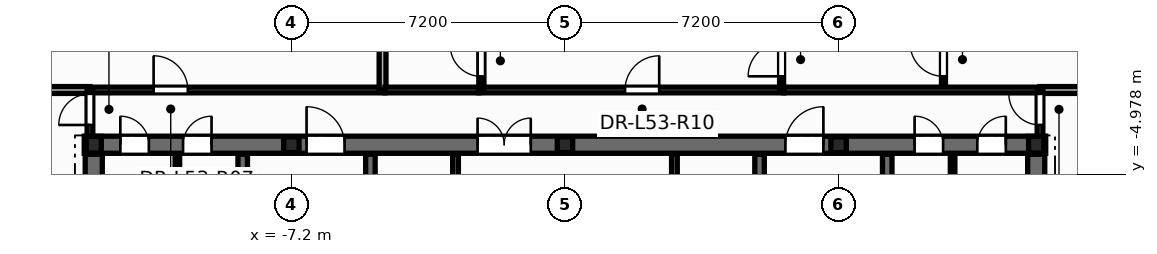
"""IFC4 building model, lengths in metres.
Left out: names, types, materials, properties, quantities, classifications, styles, units other than length and angle.
Written with IfcOpenShell. Run it as: python <this file> out.ifc"""

import sys

from ifc_helpers import new_model, si_unit, direction, frame, frame_2d, origin, origin_2d, place, context, subcontext, project, spatial, rectangle, i_section, extrude, element, fill, save


model = new_model("IFC4")
c1 = context("Model", 3, precision=1e-05, world=origin(), true_north=direction((0.0, 1.0)))
c2 = subcontext(c1, "Body", "Model", "MODEL_VIEW")
j1 = project(units=[si_unit("LENGTHUNIT", "METRE"), si_unit("PLANEANGLEUNIT", "RADIAN")], contexts=[c1])
p1 = place(None, origin())
s1 = spatial("IfcSite", under=j1, at=p1, CompositionType="ELEMENT")
p2 = place(p1, origin())
s2 = spatial("IfcBuilding", under=s1, at=p2, CompositionType="ELEMENT")
p3 = place(p2, frame((0.0, 0.0, 203.7)))
s3 = spatial("IfcBuildingStorey", under=s2, at=p3, CompositionType="ELEMENT", Elevation=203.7)
for number, where, z_axis, x_axis in (
    (1, (12.4, -4.2, 0.0), (0.0, 0.0, 1.0), (1.0, 0.0, 0.0)),
    (2, (-12.4, -4.2, 0.0), (0.0, 0.0, 1.0), (1.0, 0.0, 0.0)),
):
    element("IfcColumn", number, at=place(p3, frame(where, z_axis=z_axis, x_axis=x_axis)), inside=s3, PredefinedType="COLUMN", context=c2, shape_type="SweptSolid", body=[
        extrude(i_section(OverallWidth=0.4, OverallDepth=0.44, WebThickness=0.028, FlangeThickness=0.04, at=origin_2d()), origin(), (0.0, 0.0, 1.0), 3.6),
    ])
for number, where, z_axis, x_axis in (
    (3, (-7.2, -4.2, 0.0), (0.0, 0.0, 1.0), (1.0, 0.0, 0.0)),
    (4, (0.0, -4.2, 0.0), (0.0, 0.0, 1.0), (1.0, 0.0, 0.0)),
    (5, (7.2, -4.2, 0.0), (0.0, 0.0, 1.0), (1.0, 0.0, 0.0)),
):
    element("IfcColumn", number, at=place(p3, frame(where, z_axis=z_axis, x_axis=x_axis)), inside=s3, PredefinedType="PILASTER", context=c2, shape_type="SweptSolid", body=[
        extrude(i_section(OverallWidth=0.405, OverallDepth=0.414, WebThickness=0.022, FlangeThickness=0.032, at=origin_2d()), origin(), (0.0, 0.0, 1.0), 3.6),
    ])
p4 = place(p3, frame((-2.88, -7.1, 0.0), z_axis=(0.0, 0.0, 1.0), x_axis=(0.0, 1.0, 0.0)))
e6 = element("IfcWall", 6, at=p4, inside=s3, PredefinedType="PARTITIONING", context=c2, shape_type="SweptSolid", body=[
    extrude(rectangle(XDim=2.65, YDim=0.15, at=frame_2d((1.325, 0.0))), origin(), (0.0, 0.0, 1.0), 3.345),
])
p5 = place(p4, frame((0.85, 0.0, 0.0)))
e7 = element("IfcOpeningElement", 7, at=p5, cuts=e6, PredefinedType="OPENING", context=c2, shape_type="SweptSolid", body=[
    extrude(rectangle(XDim=0.886, YDim=2.104, at=frame_2d((0.44, 1.052))), frame((0.0, 0.085, 0.0), z_axis=(0.0, -1.0, 0.0), x_axis=(1.0, 0.0, 0.0)), (0.0, 0.0, 1.0), 0.17),
])
p6 = place(p3, frame((2.88, -7.1, 0.0), z_axis=(0.0, 0.0, 1.0), x_axis=(0.0, 1.0, 0.0)))
e8 = element("IfcWall", 8, at=p6, inside=s3, PredefinedType="PARTITIONING", context=c2, shape_type="SweptSolid", body=[
    extrude(rectangle(XDim=2.65, YDim=0.15, at=frame_2d((1.325, 0.0))), origin(), (0.0, 0.0, 1.0), 3.345),
])
p7 = place(p6, frame((0.85, 0.0, 0.0)))
e9 = element("IfcOpeningElement", 9, at=p7, cuts=e8, PredefinedType="OPENING", context=c2, shape_type="SweptSolid", body=[
    extrude(rectangle(XDim=0.886, YDim=2.104, at=frame_2d((0.44, 1.052))), frame((0.0, 0.085, 0.0), z_axis=(0.0, -1.0, 0.0), x_axis=(1.0, 0.0, 0.0)), (0.0, 0.0, 1.0), 0.17),
])
for number, where, z_axis, x_axis in (
    (10, (-10.2, -5.52, 0.0), (0.0, 0.0, 1.0), (0.0, 1.0, 0.0)),
    (11, (10.2, -5.52, 0.0), (0.0, 0.0, 1.0), (0.0, 1.0, 0.0)),
):
    element("IfcWall", number, at=place(p3, frame(where, z_axis=z_axis, x_axis=x_axis)), inside=s3, PredefinedType="PARTITIONING", context=c2, shape_type="SweptSolid", body=[
        extrude(rectangle(XDim=1.12, YDim=0.12, at=frame_2d((0.56, 0.0))), origin(), (0.0, 0.0, 1.0), 3.345),
    ])
p8 = place(p3, frame((-12.65, -4.2, 0.0), z_axis=(0.0, 0.0, 1.0), x_axis=(1.0, 0.0, 0.0)))
e12 = element("IfcWall", 12, at=p8, inside=s3, PredefinedType="SHEAR", context=c2, shape_type="SweptSolid", body=[
    extrude(rectangle(XDim=25.3, YDim=0.45, at=frame_2d((12.65, 0.0))), origin(), (0.0, 0.0, 1.0), 3.6),
])
p9 = place(p8, frame((0.95, 0.0, 0.0)))
e13 = element("IfcOpeningElement", 13, at=p9, cuts=e12, PredefinedType="OPENING", context=c2, shape_type="SweptSolid", body=[
    extrude(rectangle(XDim=0.756, YDim=2.054, at=frame_2d((0.375, 1.027))), frame((0.0, 0.235, 0.0), z_axis=(0.0, -1.0, 0.0), x_axis=(1.0, 0.0, 0.0)), (0.0, 0.0, 1.0), 0.47),
])
p10 = place(p8, frame((2.6, 0.0, 0.0)))
e14 = element("IfcOpeningElement", 14, at=p10, cuts=e12, PredefinedType="OPENING", context=c2, shape_type="SweptSolid", body=[
    extrude(rectangle(XDim=0.756, YDim=2.054, at=frame_2d((0.375, 1.027))), frame((0.0, 0.235, 0.0), z_axis=(0.0, -1.0, 0.0), x_axis=(1.0, 0.0, 0.0)), (0.0, 0.0, 1.0), 0.47),
])
p11 = place(p8, frame((21.85, 0.0, 0.0)))
e15 = element("IfcOpeningElement", 15, at=p11, cuts=e12, PredefinedType="OPENING", context=c2, shape_type="SweptSolid", body=[
    extrude(rectangle(XDim=0.756, YDim=2.054, at=frame_2d((0.375, 1.027))), frame((0.0, 0.235, 0.0), z_axis=(0.0, -1.0, 0.0), x_axis=(1.0, 0.0, 0.0)), (0.0, 0.0, 1.0), 0.47),
])
p12 = place(p8, frame((23.5, 0.0, 0.0)))
e16 = element("IfcOpeningElement", 16, at=p12, cuts=e12, PredefinedType="OPENING", context=c2, shape_type="SweptSolid", body=[
    extrude(rectangle(XDim=0.756, YDim=2.054, at=frame_2d((0.375, 1.027))), frame((0.0, 0.235, 0.0), z_axis=(0.0, -1.0, 0.0), x_axis=(1.0, 0.0, 0.0)), (0.0, 0.0, 1.0), 0.47),
])
p13 = place(p8, frame((5.85, 0.0, 0.0)))
e17 = element("IfcOpeningElement", 17, at=p13, cuts=e12, PredefinedType="OPENING", context=c2, shape_type="SweptSolid", body=[
    extrude(rectangle(XDim=1.006, YDim=2.104, at=frame_2d((0.5, 1.052))), frame((0.0, 0.235, 0.0), z_axis=(0.0, -1.0, 0.0), x_axis=(1.0, 0.0, 0.0)), (0.0, 0.0, 1.0), 0.47),
])
p14 = place(p8, frame((10.35, 0.0, 0.0)))
e18 = element("IfcOpeningElement", 18, at=p14, cuts=e12, PredefinedType="OPENING", context=c2, shape_type="SweptSolid", body=[
    extrude(rectangle(XDim=1.406, YDim=2.154, at=frame_2d((0.7, 1.077))), frame((0.0, 0.235, 0.0), z_axis=(0.0, -1.0, 0.0), x_axis=(1.0, 0.0, 0.0)), (0.0, 0.0, 1.0), 0.47),
])
p15 = place(p8, frame((18.45, 0.0, 0.0)))
e19 = element("IfcOpeningElement", 19, at=p15, cuts=e12, PredefinedType="OPENING", context=c2, shape_type="SweptSolid", body=[
    extrude(rectangle(XDim=1.006, YDim=2.104, at=frame_2d((0.5, 1.052))), frame((0.0, 0.235, 0.0), z_axis=(0.0, -1.0, 0.0), x_axis=(1.0, 0.0, 0.0)), (0.0, 0.0, 1.0), 0.47),
])
p16 = place(p3, frame((-8.48, -13.85, 0.0), z_axis=(0.0, 0.0, 1.0), x_axis=(0.0, 1.0, 0.0)))
e20 = element("IfcWall", 20, at=p16, inside=s3, PredefinedType="SHEAR", context=c2, shape_type="SweptSolid", body=[
    extrude(rectangle(XDim=9.4, YDim=0.25, at=frame_2d((4.7, 0.0))), origin(), (0.0, 0.0, 1.0), 3.6),
])
p17 = place(p16, frame((6.95, 0.0, 0.0)))
e21 = element("IfcOpeningElement", 21, at=p17, cuts=e20, PredefinedType="OPENING", context=c2, shape_type="SweptSolid", body=[
    extrude(rectangle(XDim=1.006, YDim=2.104, at=frame_2d((0.5, 1.052))), frame((0.0, 0.135, 0.0), z_axis=(0.0, -1.0, 0.0), x_axis=(1.0, 0.0, 0.0)), (0.0, 0.0, 1.0), 0.27),
])
p18 = place(p3, frame((8.48, -13.85, 0.0), z_axis=(0.0, 0.0, 1.0), x_axis=(0.0, 1.0, 0.0)))
e22 = element("IfcWall", 22, at=p18, inside=s3, PredefinedType="SHEAR", context=c2, shape_type="SweptSolid", body=[
    extrude(rectangle(XDim=9.4, YDim=0.25, at=frame_2d((4.7, 0.0))), origin(), (0.0, 0.0, 1.0), 3.6),
])
p19 = place(p18, frame((6.95, 0.0, 0.0)))
e23 = element("IfcOpeningElement", 23, at=p19, cuts=e22, PredefinedType="OPENING", context=c2, shape_type="SweptSolid", body=[
    extrude(rectangle(XDim=1.006, YDim=2.104, at=frame_2d((0.5, 1.052))), frame((0.0, 0.135, 0.0), z_axis=(0.0, -1.0, 0.0), x_axis=(1.0, 0.0, 0.0)), (0.0, 0.0, 1.0), 0.27),
])
for number, where, z_axis, x_axis in (
    (24, (-5.12, -13.85, 0.0), (0.0, 0.0, 1.0), (0.0, 1.0, 0.0)),
    (25, (5.12, -13.85, 0.0), (0.0, 0.0, 1.0), (0.0, 1.0, 0.0)),
):
    element("IfcWall", number, at=place(p3, frame(where, z_axis=z_axis, x_axis=x_axis)), inside=s3, PredefinedType="SHEAR", context=c2, shape_type="SweptSolid", body=[
        extrude(rectangle(XDim=9.4, YDim=0.25, at=frame_2d((4.7, 0.0))), origin(), (0.0, 0.0, 1.0), 3.6),
    ])
for number, where, z_axis, x_axis in (
    (26, (-12.4, -13.85, 0.0), (0.0, 0.0, 1.0), (0.0, 1.0, 0.0)),
    (27, (12.4, -13.85, 0.0), (0.0, 0.0, 1.0), (0.0, 1.0, 0.0)),
):
    element("IfcWall", number, at=place(p3, frame(where, z_axis=z_axis, x_axis=x_axis)), inside=s3, PredefinedType="SHEAR", context=c2, shape_type="SweptSolid", body=[
        extrude(rectangle(XDim=9.4, YDim=0.45, at=frame_2d((4.7, 0.0))), origin(), (0.0, 0.0, 1.0), 3.6),
    ])
p20 = place(p3, frame((-2.26, -2.76, 0.0), z_axis=(0.0, 0.0, 1.0), x_axis=(1.0, 0.0, 0.0)))
e28 = element("IfcWall", 28, at=p20, inside=s3, PredefinedType="PARTITIONING", context=c2, shape_type="SweptSolid", body=[
    extrude(rectangle(XDim=8.02, YDim=0.15, at=frame_2d((4.01, 0.0))), origin(), (0.0, 0.0, 1.0), 2.32),
])
p21 = place(p20, frame((3.84, 0.0, 0.0)))
e29 = element("IfcOpeningElement", 29, at=p21, cuts=e28, PredefinedType="OPENING", context=c2, shape_type="SweptSolid", body=[
    extrude(rectangle(XDim=0.906, YDim=2.104, at=frame_2d((0.45, 1.052))), frame((0.0, 0.085, 0.0), z_axis=(0.0, -1.0, 0.0), x_axis=(1.0, 0.0, 0.0)), (0.0, 0.0, 1.0), 0.17),
])
p22 = place(p3, frame((-12.5, -2.76, 0.0), z_axis=(0.0, 0.0, 1.0), x_axis=(1.0, 0.0, 0.0)))
e30 = element("IfcWall", 30, at=p22, inside=s3, PredefinedType="PARTITIONING", context=c2, shape_type="SweptSolid", body=[
    extrude(rectangle(XDim=7.76, YDim=0.15, at=frame_2d((3.88, 0.0))), origin(), (0.0, 0.0, 1.0), 2.32),
])
p23 = place(p22, frame((1.675, 0.0, 0.0)))
e31 = element("IfcOpeningElement", 31, at=p23, cuts=e30, PredefinedType="OPENING", context=c2, shape_type="SweptSolid", body=[
    extrude(rectangle(XDim=0.906, YDim=2.104, at=frame_2d((0.45, 1.052))), frame((0.0, 0.085, 0.0), z_axis=(0.0, -1.0, 0.0), x_axis=(1.0, 0.0, 0.0)), (0.0, 0.0, 1.0), 0.17),
])
p24 = place(p3, frame((9.96, -2.76, 0.0), z_axis=(0.0, 0.0, 1.0), x_axis=(0.0, 1.0, 0.0)))
e32 = element("IfcWall", 32, at=p24, inside=s3, PredefinedType="PARTITIONING", context=c2, shape_type="SweptSolid", body=[
    extrude(rectangle(XDim=6.911, YDim=0.105, at=frame_2d((3.455, 0.0))), origin(), (0.0, 0.0, 1.0), 2.62),
])
p25 = place(p24, frame((0.36, 0.0, 0.0)))
e33 = element("IfcOpeningElement", 33, at=p25, cuts=e32, PredefinedType="OPENING", context=c2, shape_type="SweptSolid", body=[
    extrude(rectangle(XDim=0.886, YDim=2.104, at=frame_2d((0.44, 1.052))), frame((0.0, 0.062, 0.0), z_axis=(0.0, -1.0, 0.0), x_axis=(1.0, 0.0, 0.0)), (0.0, 0.0, 1.0), 0.125),
])
p26 = place(p3, frame((5.7, -2.76, 0.0), z_axis=(0.0, 0.0, 1.0), x_axis=(0.0, 1.0, 0.0)))
e34 = element("IfcWall", 34, at=p26, inside=s3, PredefinedType="PARTITIONING", context=c2, shape_type="SweptSolid", body=[
    extrude(rectangle(XDim=6.52, YDim=0.105, at=frame_2d((3.26, 0.0))), origin(), (0.0, 0.0, 1.0), 2.32),
])
p27 = place(p26, frame((0.36, 0.0, 0.0)))
e35 = element("IfcOpeningElement", 35, at=p27, cuts=e34, PredefinedType="OPENING", context=c2, shape_type="SweptSolid", body=[
    extrude(rectangle(XDim=0.886, YDim=2.104, at=frame_2d((0.44, 1.052))), frame((0.0, 0.062, 0.0), z_axis=(0.0, -1.0, 0.0), x_axis=(1.0, 0.0, 0.0)), (0.0, 0.0, 1.0), 0.125),
])
p28 = place(p3, frame((-4.8, -2.76, 0.0), z_axis=(0.0, 0.0, 1.0), x_axis=(0.0, 1.0, 0.0)))
e36 = element("IfcWall", 36, at=p28, inside=s3, PredefinedType="PARTITIONING", context=c2, shape_type="SweptSolid", body=[
    extrude(rectangle(XDim=13.14, YDim=0.18, at=frame_2d((6.57, 0.0))), origin(), (0.0, 0.0, 1.0), 2.32),
])
p29 = place(p3, frame((5.762, -2.76, 0.0), z_axis=(0.0, 0.0, 1.0), x_axis=(1.0, 0.0, 0.0)))
e37 = element("IfcWall", 37, at=p29, inside=s3, PredefinedType="PARTITIONING", context=c2, shape_type="SweptSolid", body=[
    extrude(rectangle(XDim=6.738, YDim=0.15, at=frame_2d((3.369, 0.0))), origin(), (0.0, 0.0, 1.0), 2.32),
])
p30 = place(p3, frame((-2.2, -2.76, 0.0), z_axis=(0.0, 0.0, 1.0), x_axis=(0.0, 1.0, 0.0)))
e38 = element("IfcWall", 38, at=p30, inside=s3, PredefinedType="PARTITIONING", context=c2, shape_type="SweptSolid", body=[
    extrude(rectangle(XDim=2.92, YDim=0.135, at=frame_2d((1.46, 0.0))), origin(), (0.0, 0.0, 1.0), 3.345),
])
p31 = place(p30, frame((0.357, 0.0, 0.0)))
e39 = element("IfcOpeningElement", 39, at=p31, cuts=e38, PredefinedType="OPENING", context=c2, shape_type="SweptSolid", body=[
    extrude(rectangle(XDim=0.826, YDim=2.104, at=frame_2d((0.41, 1.052))), frame((0.0, 0.078, 0.0), z_axis=(0.0, -1.0, 0.0), x_axis=(1.0, 0.0, 0.0)), (0.0, 0.0, 1.0), 0.155),
])
p32 = place(p3, frame((-4.738, -2.76, 0.0), z_axis=(0.0, 0.0, 1.0), x_axis=(1.0, 0.0, 0.0)))
e40 = element("IfcWall", 40, at=p32, inside=s3, PredefinedType="PARTITIONING", context=c2, shape_type="SweptSolid", body=[
    extrude(rectangle(XDim=2.476, YDim=0.15, at=frame_2d((1.238, 0.0))), origin(), (0.0, 0.0, 1.0), 2.964),
])
for number, where, z_axis, x_axis in (
    (41, (-14.926, -2.76, 0.0), (0.0, 0.0, 1.0), (1.0, 0.0, 0.0)),
    (42, (12.5, -2.76, 0.0), (0.0, 0.0, 1.0), (1.0, 0.0, 0.0)),
):
    element("IfcWall", number, at=place(p3, frame(where, z_axis=z_axis, x_axis=x_axis)), inside=s3, PredefinedType="PARTITIONING", context=c2, shape_type="SweptSolid", body=[
        extrude(rectangle(XDim=2.426, YDim=0.18, at=frame_2d((1.213, 0.0))), origin(), (0.0, 0.0, 1.0), 2.62),
    ])
p33 = place(p3, frame((-12.5, -4.24, 0.0), z_axis=(0.0, 0.0, 1.0), x_axis=(0.0, 1.0, 0.0)))
e43 = element("IfcWall", 43, at=p33, inside=s3, PredefinedType="PARTITIONING", context=c2, shape_type="SweptSolid", body=[
    extrude(rectangle(XDim=1.48, YDim=0.15, at=frame_2d((0.74, 0.0))), origin(), (0.0, 0.0, 1.0), 2.32),
])
p34 = place(p33, frame((0.56, 0.0, 0.0)))
e44 = element("IfcOpeningElement", 44, at=p34, cuts=e43, PredefinedType="OPENING", context=c2, shape_type="SweptSolid", body=[
    extrude(rectangle(XDim=0.826, YDim=2.104, at=frame_2d((0.41, 1.052))), frame((0.0, 0.085, 0.0), z_axis=(0.0, -1.0, 0.0), x_axis=(1.0, 0.0, 0.0)), (0.0, 0.0, 1.0), 0.17),
])
p35 = place(p3, frame((12.5, -4.24, 0.0), z_axis=(0.0, 0.0, 1.0), x_axis=(0.0, 1.0, 0.0)))
e45 = element("IfcWall", 45, at=p35, inside=s3, PredefinedType="PARTITIONING", context=c2, shape_type="SweptSolid", body=[
    extrude(rectangle(XDim=1.48, YDim=0.15, at=frame_2d((0.74, 0.0))), origin(), (0.0, 0.0, 1.0), 2.32),
])
p36 = place(p35, frame((0.56, 0.0, 0.0)))
e46 = element("IfcOpeningElement", 46, at=p36, cuts=e45, PredefinedType="OPENING", context=c2, shape_type="SweptSolid", body=[
    extrude(rectangle(XDim=0.826, YDim=2.104, at=frame_2d((0.41, 1.052))), frame((0.0, 0.085, 0.0), z_axis=(0.0, -1.0, 0.0), x_axis=(1.0, 0.0, 0.0)), (0.0, 0.0, 1.0), 0.17),
])
p37 = place(p9, origin())
e47 = element("IfcDoor", 47, at=p37, inside=s3, OperationType="SINGLE_SWING_LEFT", PredefinedType="DOOR", context=c2, shape_type="SweptSolid", body=[
    extrude(rectangle(XDim=0.75, YDim=2.05, at=frame_2d((0.375, 1.025))), frame((0.0, 0.025, 0.0), z_axis=(0.0, -1.0, 0.0), x_axis=(1.0, 0.0, 0.0)), (0.0, 0.0, 1.0), 0.05),
])
fill(e13, e47)
p38 = place(p10, origin())
e48 = element("IfcDoor", 48, at=p38, inside=s3, OperationType="SINGLE_SWING_RIGHT", PredefinedType="DOOR", context=c2, shape_type="SweptSolid", body=[
    extrude(rectangle(XDim=0.75, YDim=2.05, at=frame_2d((0.375, 1.025))), frame((0.0, 0.025, 0.0), z_axis=(0.0, -1.0, 0.0), x_axis=(1.0, 0.0, 0.0)), (0.0, 0.0, 1.0), 0.05),
])
fill(e14, e48)
p39 = place(p11, origin())
e49 = element("IfcDoor", 49, at=p39, inside=s3, OperationType="SINGLE_SWING_LEFT", PredefinedType="DOOR", context=c2, shape_type="SweptSolid", body=[
    extrude(rectangle(XDim=0.75, YDim=2.05, at=frame_2d((0.375, 1.025))), frame((0.0, 0.025, 0.0), z_axis=(0.0, -1.0, 0.0), x_axis=(1.0, 0.0, 0.0)), (0.0, 0.0, 1.0), 0.05),
])
fill(e15, e49)
p40 = place(p12, origin())
e50 = element("IfcDoor", 50, at=p40, inside=s3, OperationType="SINGLE_SWING_RIGHT", PredefinedType="DOOR", context=c2, shape_type="SweptSolid", body=[
    extrude(rectangle(XDim=0.75, YDim=2.05, at=frame_2d((0.375, 1.025))), frame((0.0, 0.025, 0.0), z_axis=(0.0, -1.0, 0.0), x_axis=(1.0, 0.0, 0.0)), (0.0, 0.0, 1.0), 0.05),
])
fill(e16, e50)
p41 = place(p13, origin())
e51 = element("IfcDoor", 51, at=p41, inside=s3, OperationType="SINGLE_SWING_LEFT", PredefinedType="DOOR", context=c2, shape_type="SweptSolid", body=[
    extrude(rectangle(XDim=1.0, YDim=2.1, at=frame_2d((0.5, 1.05))), frame((0.0, 0.025, 0.0), z_axis=(0.0, -1.0, 0.0), x_axis=(1.0, 0.0, 0.0)), (0.0, 0.0, 1.0), 0.05),
])
fill(e17, e51)
p42 = place(p14, origin())
e52 = element("IfcDoor", 52, at=p42, inside=s3, OperationType="DOUBLE_DOOR_SINGLE_SWING", PredefinedType="DOOR", context=c2, shape_type="SweptSolid", body=[
    extrude(rectangle(XDim=1.4, YDim=2.15, at=frame_2d((0.7, 1.075))), frame((0.0, 0.025, 0.0), z_axis=(0.0, -1.0, 0.0), x_axis=(1.0, 0.0, 0.0)), (0.0, 0.0, 1.0), 0.05),
])
fill(e18, e52)
p43 = place(p15, origin())
e53 = element("IfcDoor", 53, at=p43, inside=s3, OperationType="SINGLE_SWING_RIGHT", PredefinedType="DOOR", context=c2, shape_type="SweptSolid", body=[
    extrude(rectangle(XDim=1.0, YDim=2.1, at=frame_2d((0.5, 1.05))), frame((0.0, 0.025, 0.0), z_axis=(0.0, -1.0, 0.0), x_axis=(1.0, 0.0, 0.0)), (0.0, 0.0, 1.0), 0.05),
])
fill(e19, e53)
p44 = place(p34, origin())
e54 = element("IfcDoor", 54, at=p44, inside=s3, OperationType="SINGLE_SWING_LEFT", PredefinedType="DOOR", context=c2, shape_type="SweptSolid", body=[
    extrude(rectangle(XDim=0.82, YDim=2.1, at=frame_2d((0.41, 1.05))), frame((0.0, 0.025, 0.0), z_axis=(0.0, -1.0, 0.0), x_axis=(1.0, 0.0, 0.0)), (0.0, 0.0, 1.0), 0.05),
])
fill(e44, e54)
p45 = place(p36, origin())
e55 = element("IfcDoor", 55, at=p45, inside=s3, OperationType="SINGLE_SWING_RIGHT", PredefinedType="DOOR", context=c2, shape_type="SweptSolid", body=[
    extrude(rectangle(XDim=0.82, YDim=2.1, at=frame_2d((0.41, 1.05))), frame((0.0, 0.025, 0.0), z_axis=(0.0, -1.0, 0.0), x_axis=(1.0, 0.0, 0.0)), (0.0, 0.0, 1.0), 0.05),
])
fill(e46, e55)
p46 = place(p23, origin())
e56 = element("IfcDoor", 56, at=p46, inside=s3, OperationType="SINGLE_SWING_LEFT", PredefinedType="DOOR", context=c2, shape_type="SweptSolid", body=[
    extrude(rectangle(XDim=0.9, YDim=2.1, at=frame_2d((0.45, 1.05))), frame((0.0, 0.025, 0.0), z_axis=(0.0, -1.0, 0.0), x_axis=(1.0, 0.0, 0.0)), (0.0, 0.0, 1.0), 0.05),
])
fill(e31, e56)
p47 = place(p31, origin())
e57 = element("IfcDoor", 57, at=p47, inside=s3, OperationType="SINGLE_SWING_RIGHT", PredefinedType="DOOR", context=c2, shape_type="SweptSolid", body=[
    extrude(rectangle(XDim=0.82, YDim=2.1, at=frame_2d((0.41, 1.05))), frame((0.0, 0.025, 0.0), z_axis=(0.0, -1.0, 0.0), x_axis=(1.0, 0.0, 0.0)), (0.0, 0.0, 1.0), 0.05),
])
fill(e39, e57)
p48 = place(p21, origin())
e58 = element("IfcDoor", 58, at=p48, inside=s3, OperationType="SINGLE_SWING_RIGHT", PredefinedType="DOOR", context=c2, shape_type="SweptSolid", body=[
    extrude(rectangle(XDim=0.9, YDim=2.1, at=frame_2d((0.45, 1.05))), frame((0.0, 0.025, 0.0), z_axis=(0.0, -1.0, 0.0), x_axis=(1.0, 0.0, 0.0)), (0.0, 0.0, 1.0), 0.05),
])
fill(e29, e58)
p49 = place(p27, origin())
e59 = element("IfcDoor", 59, at=p49, inside=s3, OperationType="SINGLE_SWING_LEFT", PredefinedType="DOOR", context=c2, shape_type="SweptSolid", body=[
    extrude(rectangle(XDim=0.88, YDim=2.1, at=frame_2d((0.44, 1.05))), frame((0.0, 0.025, 0.0), z_axis=(0.0, -1.0, 0.0), x_axis=(1.0, 0.0, 0.0)), (0.0, 0.0, 1.0), 0.05),
])
fill(e35, e59)
p50 = place(p25, origin())
e60 = element("IfcDoor", 60, at=p50, inside=s3, OperationType="SINGLE_SWING_RIGHT", PredefinedType="DOOR", context=c2, shape_type="SweptSolid", body=[
    extrude(rectangle(XDim=0.88, YDim=2.1, at=frame_2d((0.44, 1.05))), frame((0.0, 0.025, 0.0), z_axis=(0.0, -1.0, 0.0), x_axis=(1.0, 0.0, 0.0)), (0.0, 0.0, 1.0), 0.05),
])
fill(e33, e60)
save(model, sys.argv[1])
